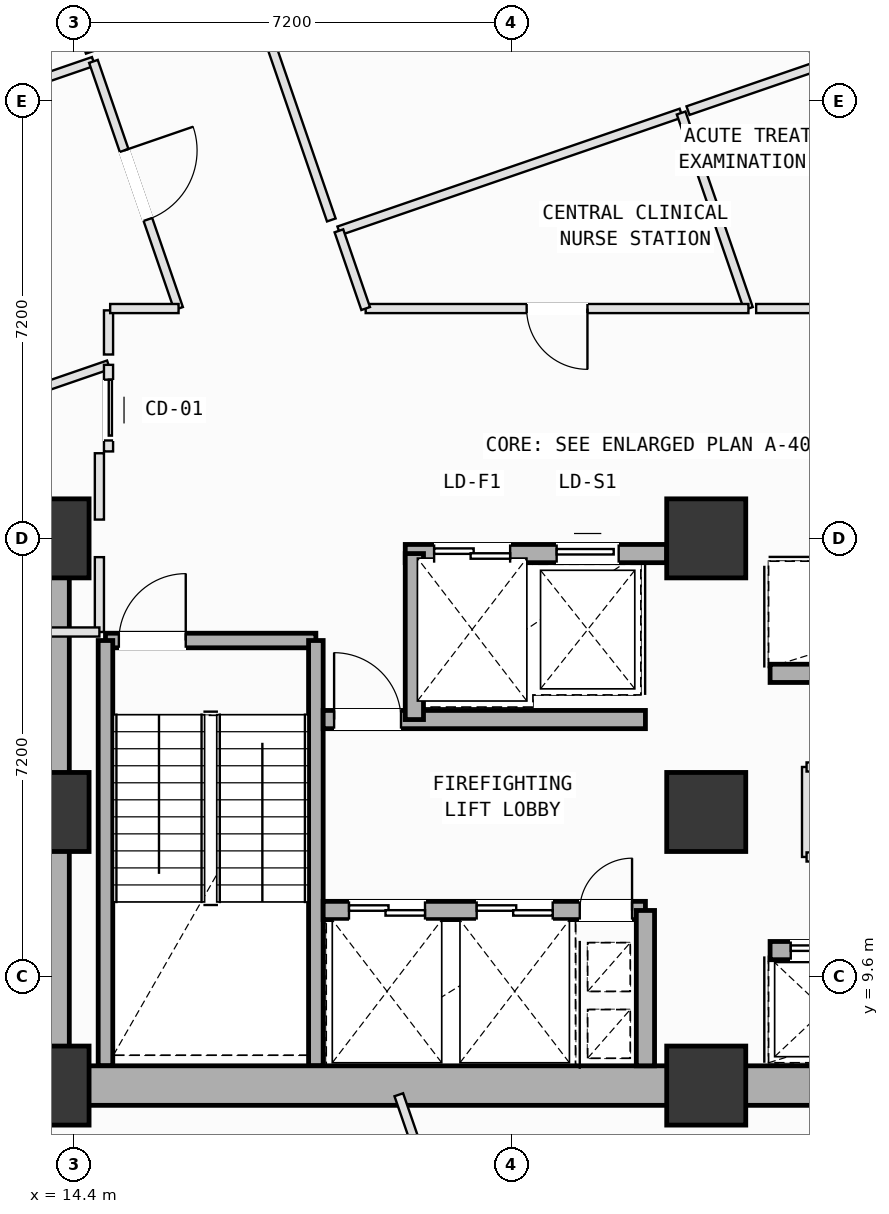
"""IFC4 building model, lengths in metres.
Left out: names, types, materials, properties, quantities, classifications, styles, units other than length and angle.
Written with IfcOpenShell. Run it as: python <this file> out.ifc"""

import sys

from ifc_helpers import new_model, si_unit, direction, frame, frame_2d, origin, origin_2d, place, context, subcontext, project, spatial, rectangle, extrude, element, fill, save


model = new_model("IFC4")
c1 = context("Model", 3, precision=1e-05, world=origin(), true_north=direction((0.0, 1.0)))
c2 = subcontext(c1, "Body", "Model", "MODEL_VIEW")
j1 = project(units=[si_unit("LENGTHUNIT", "METRE"), si_unit("PLANEANGLEUNIT", "RADIAN")], contexts=[c1])
p1 = place(None, origin())
s1 = spatial("IfcSite", under=j1, at=p1, CompositionType="ELEMENT")
p2 = place(p1, origin())
s2 = spatial("IfcBuilding", under=s1, at=p2, CompositionType="ELEMENT")
p3 = place(p2, frame((0.0, 0.0, 104.4)))
s3 = spatial("IfcBuildingStorey", under=s2, at=p3, CompositionType="ELEMENT", Elevation=104.4)
for number, where, z_axis, x_axis in (
    (1, (14.0, 7.8, 0.0), (0.0, 0.0, 1.0), (1.0, 0.0, 0.0)),
    (2, (14.0, 12.3, 0.0), (0.0, 0.0, 1.0), (1.0, 0.0, 0.0)),
    (3, (14.0, 16.8, 0.0), (0.0, 0.0, 1.0), (1.0, 0.0, 0.0)),
    (4, (24.8, 7.8, 0.0), (0.0, 0.0, 1.0), (1.0, 0.0, 0.0)),
    (5, (24.8, 12.3, 0.0), (0.0, 0.0, 1.0), (1.0, 0.0, 0.0)),
    (6, (24.8, 16.8, 0.0), (0.0, 0.0, 1.0), (1.0, 0.0, 0.0)),
):
    element("IfcColumn", number, at=place(p3, frame(where, z_axis=z_axis, x_axis=x_axis)), inside=s3, PredefinedType="COLUMN", context=c2, shape_type="SweptSolid", body=[
        extrude(rectangle(XDim=1.3, YDim=1.3, at=origin_2d()), origin(), (0.0, 0.0, 1.0), 4.0),
    ])
p4 = place(p3, frame((25.502, 28.2, 0.0), z_axis=(0.0, 0.0, 1.0), x_axis=(0.325552109917, -0.945524100025, 0.0)))
e7 = element("IfcWall", 7, at=p4, inside=s3, PredefinedType="SOLIDWALL", context=c2, shape_type="SweptSolid", body=[
    extrude(rectangle(XDim=6.76, YDim=0.32, at=frame_2d((3.38, 0.0))), origin(), (0.0, 0.0, 1.0), 2.965),
])
p5 = place(p3, frame((14.92, 15.12, 0.0), z_axis=(0.0, 0.0, 1.0), x_axis=(1.0, 0.0, 0.0)))
e8 = element("IfcWall", 8, at=p5, inside=s3, PredefinedType="SOLIDWALL", context=c2, shape_type="SweptSolid", body=[
    extrude(rectangle(XDim=3.46, YDim=0.24, at=frame_2d((1.73, 0.0))), origin(), (0.0, 0.0, 1.0), 3.78),
])
p6 = place(p5, frame((0.22, 0.0, 0.0)))
e9 = element("IfcOpeningElement", 9, at=p6, cuts=e8, PredefinedType="OPENING", context=c2, shape_type="SweptSolid", body=[
    extrude(rectangle(XDim=1.1, YDim=2.15, at=frame_2d((0.55, 1.075))), frame((0.0, 0.13, 0.0), z_axis=(0.0, -1.0, 0.0), x_axis=(1.0, 0.0, 0.0)), (0.0, 0.0, 1.0), 0.26),
])
for number, where, z_axis, x_axis in (
    (10, (18.38, 15.12, 0.0), (0.0, 0.0, 1.0), (0.0, -1.0, 0.0)),
    (11, (14.92, 8.125, 0.0), (0.0, 0.0, 1.0), (0.0, 1.0, 0.0)),
):
    element("IfcWall", number, at=place(p3, frame(where, z_axis=z_axis, x_axis=x_axis)), inside=s3, PredefinedType="SOLIDWALL", context=c2, shape_type="SweptSolid", body=[
        extrude(rectangle(XDim=6.995, YDim=0.24, at=frame_2d((3.498, 0.0))), origin(), (0.0, 0.0, 1.0), 3.78),
    ])
for number, where, z_axis, x_axis in (
    (12, (14.0, 7.8, 0.0), (0.0, 0.0, 1.0), (1.0, 0.0, 0.0)),
    (13, (24.8, 7.8, 0.0), (0.0, 0.0, 1.0), (1.0, 0.0, 0.0)),
):
    element("IfcWall", number, at=place(p3, frame(where, z_axis=z_axis, x_axis=x_axis)), inside=s3, PredefinedType="SHEAR", context=c2, shape_type="SweptSolid", body=[
        extrude(rectangle(XDim=10.8, YDim=0.65, at=frame_2d((5.4, 0.0))), origin(), (0.0, 0.0, 1.0), 3.78),
    ])
p7 = place(p3, frame((14.0, 16.8, 0.0), z_axis=(0.0, 0.0, 1.0), x_axis=(0.0, -1.0, 0.0)))
e14 = element("IfcWall", 14, at=p7, inside=s3, PredefinedType="SHEAR", context=c2, shape_type="SweptSolid", body=[
    extrude(rectangle(XDim=9.0, YDim=0.65, at=frame_2d((4.5, 0.0))), origin(), (0.0, 0.0, 1.0), 3.78),
])
p8 = place(p3, frame((19.85, 16.55, 0.0), z_axis=(0.0, 0.0, 1.0), x_axis=(1.0, 0.0, 0.0)))
e15 = element("IfcWall", 15, at=p8, inside=s3, PredefinedType="SOLIDWALL", context=c2, shape_type="SweptSolid", body=[
    extrude(rectangle(XDim=4.3, YDim=0.3, at=frame_2d((2.15, 0.0))), origin(), (0.0, 0.0, 1.0), 3.78),
])
p9 = place(p8, frame((0.475, 0.0, 0.0)))
e16 = element("IfcOpeningElement", 16, at=p9, cuts=e15, PredefinedType="OPENING", context=c2, shape_type="SweptSolid", body=[
    extrude(rectangle(XDim=1.25, YDim=2.18, at=frame_2d((0.625, 1.09))), frame((0.0, 0.16, 0.0), z_axis=(0.0, -1.0, 0.0), x_axis=(1.0, 0.0, 0.0)), (0.0, 0.0, 1.0), 0.32),
])
p10 = place(p8, frame((2.49, 0.0, 0.0)))
e17 = element("IfcOpeningElement", 17, at=p10, cuts=e15, PredefinedType="OPENING", context=c2, shape_type="SweptSolid", body=[
    extrude(rectangle(XDim=1.02, YDim=2.12, at=frame_2d((0.51, 1.06))), frame((0.0, 0.16, 0.0), z_axis=(0.0, -1.0, 0.0), x_axis=(1.0, 0.0, 0.0)), (0.0, 0.0, 1.0), 0.32),
])
p11 = place(p3, frame((18.5, 10.68, 0.0), z_axis=(0.0, 0.0, 1.0), x_axis=(1.0, 0.0, 0.0)))
e18 = element("IfcWall", 18, at=p11, inside=s3, PredefinedType="SOLIDWALL", context=c2, shape_type="SweptSolid", body=[
    extrude(rectangle(XDim=5.3, YDim=0.3, at=frame_2d((2.65, 0.0))), origin(), (0.0, 0.0, 1.0), 3.78),
])
p12 = place(p11, frame((4.22, 0.0, 0.0)))
e19 = element("IfcOpeningElement", 19, at=p12, cuts=e18, PredefinedType="OPENING", context=c2, shape_type="SweptSolid", body=[
    extrude(rectangle(XDim=0.86, YDim=2.06, at=frame_2d((0.43, 1.03))), frame((0.0, 0.16, 0.0), z_axis=(0.0, -1.0, 0.0), x_axis=(1.0, 0.0, 0.0)), (0.0, 0.0, 1.0), 0.32),
])
p13 = place(p11, frame((0.425, 0.0, 0.0)))
e20 = element("IfcOpeningElement", 20, at=p13, cuts=e18, PredefinedType="OPENING", context=c2, shape_type="SweptSolid", body=[
    extrude(rectangle(XDim=1.25, YDim=2.18, at=frame_2d((0.625, 1.09))), frame((0.0, 0.16, 0.0), z_axis=(0.0, -1.0, 0.0), x_axis=(1.0, 0.0, 0.0)), (0.0, 0.0, 1.0), 0.32),
])
p14 = place(p11, frame((2.525, 0.0, 0.0)))
e21 = element("IfcOpeningElement", 21, at=p14, cuts=e18, PredefinedType="OPENING", context=c2, shape_type="SweptSolid", body=[
    extrude(rectangle(XDim=1.25, YDim=2.18, at=frame_2d((0.625, 1.09))), frame((0.0, 0.16, 0.0), z_axis=(0.0, -1.0, 0.0), x_axis=(1.0, 0.0, 0.0)), (0.0, 0.0, 1.0), 0.32),
])
p15 = place(p3, frame((18.5, 13.82, 0.0), z_axis=(0.0, 0.0, 1.0), x_axis=(1.0, 0.0, 0.0)))
e22 = element("IfcWall", 22, at=p15, inside=s3, PredefinedType="SOLIDWALL", context=c2, shape_type="SweptSolid", body=[
    extrude(rectangle(XDim=5.3, YDim=0.3, at=frame_2d((2.65, 0.0))), origin(), (0.0, 0.0, 1.0), 3.78),
])
p16 = place(p15, frame((0.18, 0.0, 0.0)))
e23 = element("IfcOpeningElement", 23, at=p16, cuts=e22, PredefinedType="OPENING", context=c2, shape_type="SweptSolid", body=[
    extrude(rectangle(XDim=1.1, YDim=2.15, at=frame_2d((0.55, 1.075))), frame((0.0, 0.16, 0.0), z_axis=(0.0, -1.0, 0.0), x_axis=(1.0, 0.0, 0.0)), (0.0, 0.0, 1.0), 0.32),
])
p17 = place(p3, frame((23.8, 8.125, 0.0), z_axis=(0.0, 0.0, 1.0), x_axis=(0.0, 1.0, 0.0)))
e24 = element("IfcWall", 24, at=p17, inside=s3, PredefinedType="SOLIDWALL", context=c2, shape_type="SweptSolid", body=[
    extrude(rectangle(XDim=2.555, YDim=0.3, at=frame_2d((1.277, 0.0))), origin(), (0.0, 0.0, 1.0), 3.78),
])
p18 = place(p3, frame((20.0, 13.82, 0.0), z_axis=(0.0, 0.0, 1.0), x_axis=(0.0, 1.0, 0.0)))
e25 = element("IfcWall", 25, at=p18, inside=s3, PredefinedType="SOLIDWALL", context=c2, shape_type="SweptSolid", body=[
    extrude(rectangle(XDim=2.73, YDim=0.3, at=frame_2d((1.365, 0.0))), origin(), (0.0, 0.0, 1.0), 3.78),
])
p19 = place(p3, frame((25.85, 10.02, 0.0), z_axis=(0.0, 0.0, 1.0), x_axis=(1.0, 0.0, 0.0)))
e26 = element("IfcWall", 26, at=p19, inside=s3, PredefinedType="SOLIDWALL", context=c2, shape_type="SweptSolid", body=[
    extrude(rectangle(XDim=5.45, YDim=0.3, at=frame_2d((2.725, 0.0))), origin(), (0.0, 0.0, 1.0), 3.78),
])
p20 = place(p19, frame((0.34, 0.0, 0.0)))
e27 = element("IfcOpeningElement", 27, at=p20, cuts=e26, PredefinedType="OPENING", context=c2, shape_type="SweptSolid", body=[
    extrude(rectangle(XDim=1.12, YDim=2.15, at=frame_2d((0.56, 1.075))), frame((0.0, 0.16, 0.0), z_axis=(0.0, -1.0, 0.0), x_axis=(1.0, 0.0, 0.0)), (0.0, 0.0, 1.0), 0.32),
])
p21 = place(p19, frame((2.24, 0.0, 0.0)))
e28 = element("IfcOpeningElement", 28, at=p21, cuts=e26, PredefinedType="OPENING", context=c2, shape_type="SweptSolid", body=[
    extrude(rectangle(XDim=1.12, YDim=2.15, at=frame_2d((0.56, 1.075))), frame((0.0, 0.16, 0.0), z_axis=(0.0, -1.0, 0.0), x_axis=(1.0, 0.0, 0.0)), (0.0, 0.0, 1.0), 0.32),
])
p22 = place(p3, frame((25.85, 14.58, 0.0), z_axis=(0.0, 0.0, 1.0), x_axis=(1.0, 0.0, 0.0)))
e29 = element("IfcWall", 29, at=p22, inside=s3, PredefinedType="SOLIDWALL", context=c2, shape_type="SweptSolid", body=[
    extrude(rectangle(XDim=5.45, YDim=0.3, at=frame_2d((2.725, 0.0))), origin(), (0.0, 0.0, 1.0), 3.78),
])
p23 = place(p3, frame((26.45, 11.56, 0.0), z_axis=(0.0, 0.0, 1.0), x_axis=(0.0, 1.0, 0.0)))
e30 = element("IfcWall", 30, at=p23, inside=s3, PredefinedType="PARTITIONING", context=c2, shape_type="SweptSolid", body=[
    extrude(rectangle(XDim=1.48, YDim=0.15, at=frame_2d((0.74, 0.0))), origin(), (0.0, 0.0, 1.0), 3.78),
])
p24 = place(p3, frame((26.45, 13.04, 0.0), z_axis=(0.0, 0.0, 1.0), x_axis=(1.0, 0.0, 0.0)))
e31 = element("IfcWall", 31, at=p24, inside=s3, PredefinedType="PARTITIONING", context=c2, shape_type="SweptSolid", body=[
    extrude(rectangle(XDim=4.4, YDim=0.15, at=frame_2d((2.2, 0.0))), origin(), (0.0, 0.0, 1.0), 3.78),
])
p25 = place(p24, frame((1.74, 0.0, 0.0)))
e32 = element("IfcOpeningElement", 32, at=p25, cuts=e31, PredefinedType="OPENING", context=c2, shape_type="SweptSolid", body=[
    extrude(rectangle(XDim=0.92, YDim=2.1, at=frame_2d((0.46, 1.05))), frame((0.0, 0.085, 0.0), z_axis=(0.0, -1.0, 0.0), x_axis=(1.0, 0.0, 0.0)), (0.0, 0.0, 1.0), 0.17),
])
p26 = place(p3, frame((30.85, 11.56, 0.0), z_axis=(0.0, 0.0, 1.0), x_axis=(-1.0, 0.0, 0.0)))
e33 = element("IfcWall", 33, at=p26, inside=s3, PredefinedType="PARTITIONING", context=c2, shape_type="SweptSolid", body=[
    extrude(rectangle(XDim=4.4, YDim=0.15, at=frame_2d((2.2, 0.0))), origin(), (0.0, 0.0, 1.0), 3.78),
])
p27 = place(p3, frame((19.744, 7.649, 0.0), z_axis=(0.0, 0.0, 1.0), x_axis=(0.325591658157, -0.9455104823, 0.0)))
e34 = element("IfcWall", 34, at=p27, inside=s3, PredefinedType="PARTITIONING", context=c2, shape_type="SweptSolid", body=[
    extrude(rectangle(XDim=10.409, YDim=0.15, at=frame_2d((5.205, 0.0))), origin(), (0.0, 0.0, 1.0), 3.78),
])
p28 = place(p3, frame((14.82, 18.2, 0.0), z_axis=(0.0, 0.0, 1.0), x_axis=(0.0, -1.0, 0.0)))
e35 = element("IfcWall", 35, at=p28, inside=s3, PredefinedType="PARTITIONING", context=c2, shape_type="SweptSolid", body=[
    extrude(rectangle(XDim=1.091, YDim=0.15, at=frame_2d((0.545, 0.0))), origin(), (0.0, 0.0, 1.0), 3.78),
])
p29 = place(p3, frame((14.82, 16.491, 0.0), z_axis=(0.0, 0.0, 1.0), x_axis=(0.0, -1.0, 0.0)))
e36 = element("IfcWall", 36, at=p29, inside=s3, PredefinedType="PARTITIONING", context=c2, shape_type="SweptSolid", body=[
    extrude(rectangle(XDim=1.231, YDim=0.15, at=frame_2d((0.615, 0.0))), origin(), (0.0, 0.0, 1.0), 3.78),
])
p30 = place(p3, frame((14.82, 15.26, 0.0), z_axis=(0.0, 0.0, 1.0), x_axis=(-1.0, 0.0, 0.0)))
e37 = element("IfcWall", 37, at=p30, inside=s3, PredefinedType="PARTITIONING", context=c2, shape_type="SweptSolid", body=[
    extrude(rectangle(XDim=1.12, YDim=0.15, at=frame_2d((0.56, 0.0))), origin(), (0.0, 0.0, 1.0), 3.78),
])
p31 = place(p3, frame((7.382, 17.042, 0.0), z_axis=(0.0, 0.0, 1.0), x_axis=(0.945543879327, 0.325494657816, 0.0)))
e38 = element("IfcWall", 38, at=p31, inside=s3, PredefinedType="PARTITIONING", context=c2, shape_type="SweptSolid", body=[
    extrude(rectangle(XDim=8.025, YDim=0.15, at=frame_2d((4.012, 0.0))), origin(), (0.0, 0.0, 1.0), 3.78),
])
p32 = place(p3, frame((14.97, 19.654, 0.0), z_axis=(0.0, 0.0, 1.0), x_axis=(0.0, -1.0, 0.0)))
e39 = element("IfcWall", 39, at=p32, inside=s3, PredefinedType="PARTITIONING", context=c2, shape_type="SweptSolid", body=[
    extrude(rectangle(XDim=1.424, YDim=0.15, at=frame_2d((0.712, 0.0))), origin(), (0.0, 0.0, 1.0), 3.78),
])
p33 = place(p32, frame((0.244, 0.0, 0.0)))
e40 = element("IfcOpeningElement", 40, at=p33, cuts=e39, PredefinedType="OPENING", context=c2, shape_type="SweptSolid", body=[
    extrude(rectangle(XDim=1.0, YDim=2.12, at=frame_2d((0.5, 1.06))), frame((0.0, 0.085, 0.0), z_axis=(0.0, -1.0, 0.0), x_axis=(1.0, 0.0, 0.0)), (0.0, 0.0, 1.0), 0.17),
])
p34 = place(p3, frame((14.97, 20.55, 0.0), z_axis=(0.0, 0.0, 1.0), x_axis=(0.0, -1.0, 0.0)))
e41 = element("IfcWall", 41, at=p34, inside=s3, PredefinedType="PARTITIONING", context=c2, shape_type="SweptSolid", body=[
    extrude(rectangle(XDim=0.726, YDim=0.15, at=frame_2d((0.363, 0.0))), origin(), (0.0, 0.0, 1.0), 3.78),
])
p35 = place(p3, frame((5.82, 21.58, 0.0), z_axis=(0.0, 0.0, 1.0), x_axis=(0.945525547677, 0.325547905368, 0.0)))
e42 = element("IfcWall", 42, at=p35, inside=s3, PredefinedType="PARTITIONING", context=c2, shape_type="SweptSolid", body=[
    extrude(rectangle(XDim=9.415, YDim=0.15, at=frame_2d((4.708, 0.0))), origin(), (0.0, 0.0, 1.0), 3.78),
])
p36 = place(p3, frame((14.722, 24.645, 0.0), z_axis=(0.0, 0.0, 1.0), x_axis=(0.325666906351, -0.945484566827, 0.0)))
e43 = element("IfcWall", 43, at=p36, inside=s3, PredefinedType="PARTITIONING", context=c2, shape_type="SweptSolid", body=[
    extrude(rectangle(XDim=4.299, YDim=0.15, at=frame_2d((2.15, 0.0))), origin(), (0.0, 0.0, 1.0), 3.78),
])
p37 = place(p36, frame((1.55, 0.0, 0.0)))
e44 = element("IfcOpeningElement", 44, at=p37, cuts=e43, PredefinedType="OPENING", context=c2, shape_type="SweptSolid", body=[
    extrude(rectangle(XDim=1.2, YDim=2.15, at=frame_2d((0.6, 1.075))), frame((0.0, 0.085, 0.0), z_axis=(0.0, -1.0, 0.0), x_axis=(1.0, 0.0, 0.0)), (0.0, 0.0, 1.0), 0.17),
])
p38 = place(p3, frame((16.122, 20.58, 0.0), z_axis=(0.0, 0.0, 1.0), x_axis=(-1.0, 0.0, 0.0)))
e45 = element("IfcWall", 45, at=p38, inside=s3, PredefinedType="PARTITIONING", context=c2, shape_type="SweptSolid", body=[
    extrude(rectangle(XDim=1.125, YDim=0.15, at=frame_2d((0.562, 0.0))), origin(), (0.0, 0.0, 1.0), 3.78),
])
p39 = place(p3, frame((13.159, 29.184, 0.0), z_axis=(0.0, 0.0, 1.0), x_axis=(0.325651749866, -0.945489787258, 0.0)))
e46 = element("IfcWall", 46, at=p39, inside=s3, PredefinedType="PARTITIONING", context=c2, shape_type="SweptSolid", body=[
    extrude(rectangle(XDim=4.64, YDim=0.15, at=frame_2d((2.32, 0.0))), origin(), (0.0, 0.0, 1.0), 3.78),
])
p40 = place(p39, frame((1.72, 0.0, 0.0)))
e47 = element("IfcOpeningElement", 47, at=p40, cuts=e46, PredefinedType="OPENING", context=c2, shape_type="SweptSolid", body=[
    extrude(rectangle(XDim=1.2, YDim=2.15, at=frame_2d((0.6, 1.075))), frame((0.0, 0.085, 0.0), z_axis=(0.0, -1.0, 0.0), x_axis=(1.0, 0.0, 0.0)), (0.0, 0.0, 1.0), 0.17),
])
p41 = place(p3, frame((18.759, 21.858, 0.0), z_axis=(0.0, 0.0, 1.0), x_axis=(0.945511506532, 0.325588683795, 0.0)))
e48 = element("IfcWall", 48, at=p41, inside=s3, PredefinedType="PARTITIONING", context=c2, shape_type="SweptSolid", body=[
    extrude(rectangle(XDim=5.952, YDim=0.15, at=frame_2d((2.976, 0.0))), origin(), (0.0, 0.0, 1.0), 3.78),
])
p42 = place(p3, frame((24.387, 23.796, 0.0), z_axis=(0.0, 0.0, 1.0), x_axis=(0.325472958925, -0.94555134869, 0.0)))
e49 = element("IfcWall", 49, at=p42, inside=s3, PredefinedType="PARTITIONING", context=c2, shape_type="SweptSolid", body=[
    extrude(rectangle(XDim=3.401, YDim=0.15, at=frame_2d((1.7, 0.0))), origin(), (0.0, 0.0, 1.0), 2.965),
])
p43 = place(p3, frame((25.494, 20.58, 0.0), z_axis=(0.0, 0.0, 1.0), x_axis=(-1.0, 0.0, 0.0)))
e50 = element("IfcWall", 50, at=p43, inside=s3, PredefinedType="PARTITIONING", context=c2, shape_type="SweptSolid", body=[
    extrude(rectangle(XDim=6.295, YDim=0.15, at=frame_2d((3.147, 0.0))), origin(), (0.0, 0.0, 1.0), 3.78),
])
p44 = place(p43, frame((2.647, 0.0, 0.0)))
e51 = element("IfcOpeningElement", 51, at=p44, cuts=e50, PredefinedType="OPENING", context=c2, shape_type="SweptSolid", body=[
    extrude(rectangle(XDim=1.0, YDim=2.12, at=frame_2d((0.5, 1.06))), frame((0.0, 0.085, 0.0), z_axis=(0.0, -1.0, 0.0), x_axis=(1.0, 0.0, 0.0)), (0.0, 0.0, 1.0), 0.17),
])
p45 = place(p3, frame((19.199, 20.58, 0.0), z_axis=(0.0, 0.0, 1.0), x_axis=(-0.32553412095, 0.945530293591, 0.0)))
e52 = element("IfcWall", 52, at=p45, inside=s3, PredefinedType="PARTITIONING", context=c2, shape_type="SweptSolid", body=[
    extrude(rectangle(XDim=1.352, YDim=0.15, at=frame_2d((0.676, 0.0))), origin(), (0.0, 0.0, 1.0), 3.78),
])
p46 = place(p3, frame((27.7, 20.58, 0.0), z_axis=(0.0, 0.0, 1.0), x_axis=(-1.0, 0.0, 0.0)))
e53 = element("IfcWall", 53, at=p46, inside=s3, PredefinedType="PARTITIONING", context=c2, shape_type="SweptSolid", body=[
    extrude(rectangle(XDim=2.079, YDim=0.15, at=frame_2d((1.04, 0.0))), origin(), (0.0, 0.0, 1.0), 3.78),
])
p47 = place(p3, frame((24.5, 23.835, 0.0), z_axis=(0.0, 0.0, 1.0), x_axis=(0.94554475493, 0.325492114227, 0.0)))
e54 = element("IfcWall", 54, at=p47, inside=s3, PredefinedType="PARTITIONING", context=c2, shape_type="SweptSolid", body=[
    extrude(rectangle(XDim=2.234, YDim=0.15, at=frame_2d((1.117, 0.0))), origin(), (0.0, 0.0, 1.0), 3.78),
])
p48 = place(p3, frame((18.634, 22.037, 0.0), z_axis=(0.0, 0.0, 1.0), x_axis=(-0.325538681008, 0.945528723608, 0.0)))
e55 = element("IfcWall", 55, at=p48, inside=s3, PredefinedType="PARTITIONING", context=c2, shape_type="SweptSolid", body=[
    extrude(rectangle(XDim=8.34, YDim=0.15, at=frame_2d((4.17, 0.0))), origin(), (0.0, 0.0, 1.0), 3.78),
])
p49 = place(p48, frame((3.57, 0.0, 0.0)))
e56 = element("IfcOpeningElement", 56, at=p49, cuts=e55, PredefinedType="OPENING", context=c2, shape_type="SweptSolid", body=[
    extrude(rectangle(XDim=1.2, YDim=2.15, at=frame_2d((0.6, 1.075))), frame((0.0, 0.085, 0.0), z_axis=(0.0, -1.0, 0.0), x_axis=(1.0, 0.0, 0.0)), (0.0, 0.0, 1.0), 0.17),
])
p50 = place(p6, origin())
e57 = element("IfcDoor", 57, at=p50, inside=s3, OperationType="SINGLE_SWING_RIGHT", PredefinedType="DOOR", context=c2, shape_type="SweptSolid", body=[
    extrude(rectangle(XDim=1.1, YDim=2.15, at=frame_2d((0.55, 1.075))), frame((0.0, 0.025, 0.0), z_axis=(0.0, -1.0, 0.0), x_axis=(1.0, 0.0, 0.0)), (0.0, 0.0, 1.0), 0.05),
])
fill(e9, e57)
p51 = place(p12, origin())
e58 = element("IfcDoor", 58, at=p51, inside=s3, OperationType="SINGLE_SWING_RIGHT", PredefinedType="DOOR", context=c2, shape_type="SweptSolid", body=[
    extrude(rectangle(XDim=0.86, YDim=2.06, at=frame_2d((0.43, 1.03))), frame((0.0, 0.025, 0.0), z_axis=(0.0, -1.0, 0.0), x_axis=(1.0, 0.0, 0.0)), (0.0, 0.0, 1.0), 0.05),
])
fill(e19, e58)
p52 = place(p16, origin())
e59 = element("IfcDoor", 59, at=p52, inside=s3, OperationType="SINGLE_SWING_LEFT", PredefinedType="DOOR", context=c2, shape_type="SweptSolid", body=[
    extrude(rectangle(XDim=1.1, YDim=2.15, at=frame_2d((0.55, 1.075))), frame((0.0, 0.025, 0.0), z_axis=(0.0, -1.0, 0.0), x_axis=(1.0, 0.0, 0.0)), (0.0, 0.0, 1.0), 0.05),
])
fill(e23, e59)
p53 = place(p13, origin())
e60 = element("IfcDoor", 60, at=p53, inside=s3, OperationType="DOUBLE_DOOR_SLIDING", PredefinedType="DOOR", context=c2, shape_type="SweptSolid", body=[
    extrude(rectangle(XDim=1.25, YDim=2.18, at=frame_2d((0.625, 1.09))), frame((0.0, 0.025, 0.0), z_axis=(0.0, -1.0, 0.0), x_axis=(1.0, 0.0, 0.0)), (0.0, 0.0, 1.0), 0.05),
])
fill(e20, e60)
p54 = place(p14, origin())
e61 = element("IfcDoor", 61, at=p54, inside=s3, OperationType="DOUBLE_DOOR_SLIDING", PredefinedType="DOOR", context=c2, shape_type="SweptSolid", body=[
    extrude(rectangle(XDim=1.25, YDim=2.18, at=frame_2d((0.625, 1.09))), frame((0.0, 0.025, 0.0), z_axis=(0.0, -1.0, 0.0), x_axis=(1.0, 0.0, 0.0)), (0.0, 0.0, 1.0), 0.05),
])
fill(e21, e61)
p55 = place(p20, origin())
e62 = element("IfcDoor", 62, at=p55, inside=s3, OperationType="DOUBLE_DOOR_SLIDING", PredefinedType="DOOR", context=c2, shape_type="SweptSolid", body=[
    extrude(rectangle(XDim=1.12, YDim=2.15, at=frame_2d((0.56, 1.075))), frame((0.0, 0.025, 0.0), z_axis=(0.0, -1.0, 0.0), x_axis=(1.0, 0.0, 0.0)), (0.0, 0.0, 1.0), 0.05),
])
fill(e27, e62)
p56 = place(p9, origin())
e63 = element("IfcDoor", 63, at=p56, inside=s3, OperationType="DOUBLE_DOOR_SLIDING", PredefinedType="DOOR", context=c2, shape_type="SweptSolid", body=[
    extrude(rectangle(XDim=1.25, YDim=2.18, at=frame_2d((0.625, 1.09))), frame((0.0, 0.025, 0.0), z_axis=(0.0, -1.0, 0.0), x_axis=(1.0, 0.0, 0.0)), (0.0, 0.0, 1.0), 0.05),
])
fill(e16, e63)
p57 = place(p10, origin())
e64 = element("IfcDoor", 64, at=p57, inside=s3, OperationType="SLIDING_TO_LEFT", PredefinedType="DOOR", context=c2, shape_type="SweptSolid", body=[
    extrude(rectangle(XDim=1.02, YDim=2.12, at=frame_2d((0.51, 1.06))), frame((0.0, 0.025, 0.0), z_axis=(0.0, -1.0, 0.0), x_axis=(1.0, 0.0, 0.0)), (0.0, 0.0, 1.0), 0.05),
])
fill(e17, e64)
p58 = place(p33, origin())
e65 = element("IfcDoor", 65, at=p58, inside=s3, OperationType="SLIDING_TO_LEFT", PredefinedType="DOOR", context=c2, shape_type="SweptSolid", body=[
    extrude(rectangle(XDim=1.0, YDim=2.12, at=frame_2d((0.5, 1.06))), frame((0.0, 0.025, 0.0), z_axis=(0.0, -1.0, 0.0), x_axis=(1.0, 0.0, 0.0)), (0.0, 0.0, 1.0), 0.05),
])
fill(e40, e65)
p59 = place(p37, origin())
e66 = element("IfcDoor", 66, at=p59, inside=s3, OperationType="SINGLE_SWING_LEFT", PredefinedType="DOOR", context=c2, shape_type="SweptSolid", body=[
    extrude(rectangle(XDim=1.2, YDim=2.15, at=frame_2d((0.6, 1.075))), frame((0.0, 0.025, 0.0), z_axis=(0.0, -1.0, 0.0), x_axis=(1.0, 0.0, 0.0)), (0.0, 0.0, 1.0), 0.05),
])
fill(e44, e66)
p60 = place(p44, origin())
e67 = element("IfcDoor", 67, at=p60, inside=s3, OperationType="SINGLE_SWING_LEFT", PredefinedType="DOOR", context=c2, shape_type="SweptSolid", body=[
    extrude(rectangle(XDim=1.0, YDim=2.12, at=frame_2d((0.5, 1.06))), frame((0.0, 0.025, 0.0), z_axis=(0.0, -1.0, 0.0), x_axis=(1.0, 0.0, 0.0)), (0.0, 0.0, 1.0), 0.05),
])
fill(e51, e67)
save(model, sys.argv[1])
